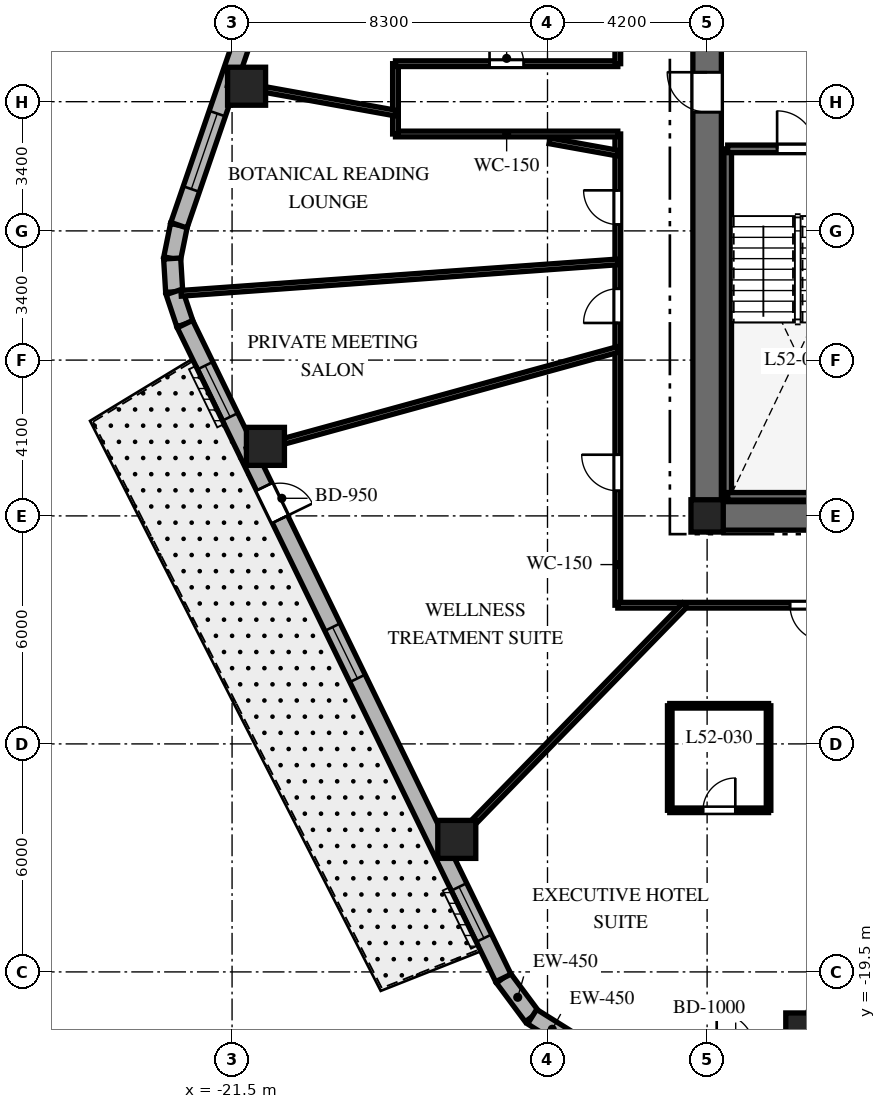
"""IFC4 building model, lengths in metres.
Left out: names, types, materials, properties, quantities, classifications, styles, units other than length and angle.
Written with IfcOpenShell. Run it as: python <this file> out.ifc"""

import sys

from ifc_helpers import new_model, si_unit, direction, frame, frame_2d, origin, origin_2d, place, context, subcontext, project, spatial, rectangle, extrude, element, fill, save


model = new_model("IFC4")
c1 = context("Model", 3, precision=1e-05, world=origin(), true_north=direction((0.0, 1.0)))
c2 = subcontext(c1, "Body", "Model", "MODEL_VIEW")
j1 = project(units=[si_unit("LENGTHUNIT", "METRE"), si_unit("PLANEANGLEUNIT", "RADIAN")], contexts=[c1])
p1 = place(None, origin())
s1 = spatial("IfcSite", under=j1, at=p1, CompositionType="ELEMENT")
p2 = place(p1, origin())
s2 = spatial("IfcBuilding", under=s1, at=p2, CompositionType="ELEMENT")
p3 = place(p2, frame((0.0, 0.0, 210.3)))
s3 = spatial("IfcBuildingStorey", under=s2, at=p3, CompositionType="ELEMENT", Elevation=210.3)
p4 = place(p3, frame((-9.375, -7.5, 0.0), z_axis=(0.0, 0.0, 1.0), x_axis=(1.0, 0.0, 0.0)))
e1 = element("IfcWall", 1, at=p4, inside=s3, PredefinedType="SHEAR", context=c2, shape_type="SweptSolid", body=[
    extrude(rectangle(XDim=18.75, YDim=0.75, at=frame_2d((9.375, 0.0))), origin(), (0.0, 0.0, 1.0), 3.8),
])
p5 = place(p4, frame((9.425, 0.0, 0.0)))
e2 = element("IfcOpeningElement", 2, at=p5, cuts=e1, PredefinedType="OPENING", context=c2, shape_type="SweptSolid", body=[
    extrude(rectangle(XDim=1.0, YDim=2.15, at=frame_2d((0.5, 1.075))), frame((0.0, 0.385, 0.0), z_axis=(0.0, -1.0, 0.0), x_axis=(1.0, 0.0, 0.0)), (0.0, 0.0, 1.0), 0.77),
])
p6 = place(p3, frame((-9.0, -7.125, 0.0), z_axis=(0.0, 0.0, 1.0), x_axis=(0.0, 1.0, 0.0)))
e3 = element("IfcWall", 3, at=p6, inside=s3, PredefinedType="SHEAR", context=c2, shape_type="SweptSolid", body=[
    extrude(rectangle(XDim=14.25, YDim=0.75, at=frame_2d((7.125, 0.0))), origin(), (0.0, 0.0, 1.0), 3.8),
])
p7 = place(p6, frame((10.25, 0.0, 0.0)))
e4 = element("IfcOpeningElement", 4, at=p7, cuts=e3, PredefinedType="OPENING", context=c2, shape_type="SweptSolid", body=[
    extrude(rectangle(XDim=1.05, YDim=2.15, at=frame_2d((0.525, 1.075))), frame((0.0, 0.385, 0.0), z_axis=(0.0, -1.0, 0.0), x_axis=(1.0, 0.0, 0.0)), (0.0, 0.0, 1.0), 0.77),
])
p8 = place(p3, frame((-8.458, -6.985, 0.0), z_axis=(0.0, 0.0, 1.0), x_axis=(0.0, 1.0, 0.0)))
e5 = element("IfcWall", 5, at=p8, inside=s3, PredefinedType="SHEAR", context=c2, shape_type="SweptSolid", body=[
    extrude(rectangle(XDim=9.143, YDim=0.2, at=frame_2d((4.572, 0.0))), origin(), (0.0, 0.0, 1.0), 3.8),
])
p9 = place(p3, frame((-8.458, -6.985, 0.0), z_axis=(0.0, 0.0, 1.0), x_axis=(1.0, 0.0, 0.0)))
e6 = element("IfcWall", 6, at=p9, inside=s3, PredefinedType="SHEAR", context=c2, shape_type="SweptSolid", body=[
    extrude(rectangle(XDim=3.686, YDim=0.2, at=frame_2d((1.843, 0.0))), origin(), (0.0, 0.0, 1.0), 3.8),
])
p10 = place(p3, frame((-8.458, 2.158, 0.0), z_axis=(0.0, 0.0, 1.0), x_axis=(1.0, 0.0, 0.0)))
e7 = element("IfcWall", 7, at=p10, inside=s3, PredefinedType="SHEAR", context=c2, shape_type="SweptSolid", body=[
    extrude(rectangle(XDim=3.686, YDim=0.2, at=frame_2d((1.843, 0.0))), origin(), (0.0, 0.0, 1.0), 3.8),
])
p11 = place(p10, frame((1.3, 0.0, 0.0)))
e8 = element("IfcOpeningElement", 8, at=p11, cuts=e7, PredefinedType="OPENING", context=c2, shape_type="SweptSolid", body=[
    extrude(rectangle(XDim=1.0, YDim=2.15, at=frame_2d((0.5, 1.075))), frame((0.0, 0.11, 0.0), z_axis=(0.0, -1.0, 0.0), x_axis=(1.0, 0.0, 0.0)), (0.0, 0.0, 1.0), 0.22),
])
p12 = place(p3, frame((-9.0, -7.5, 0.0), z_axis=(0.0, 0.0, 1.0), x_axis=(1.0, 0.0, 0.0)))
e9 = element("IfcColumn", 9, at=p12, inside=s3, PredefinedType="COLUMN", context=c2, shape_type="SweptSolid", body=[
    extrude(rectangle(XDim=0.85, YDim=0.85, at=origin_2d()), origin(), (0.0, 0.0, 1.0), 3.8),
])
for number, where, z_axis, x_axis in (
    (10, (-6.43, -21.08, 0.0), (0.0, 0.0, 1.0), (1.0, 0.0, 0.0)),
    (11, (-21.118, 3.807, 0.0), (0.0, 0.0, 1.0), (1.0, 0.0, 0.0)),
    (12, (-20.622, -5.67, 0.0), (0.0, 0.0, 1.0), (1.0, 0.0, 0.0)),
    (13, (-15.587, -16.013, 0.0), (0.0, 0.0, 1.0), (1.0, 0.0, 0.0)),
):
    element("IfcColumn", number, at=place(p3, frame(where, z_axis=z_axis, x_axis=x_axis)), inside=s3, PredefinedType="COLUMN", context=c2, shape_type="SweptSolid", body=[
        extrude(rectangle(XDim=1.0, YDim=1.0, at=origin_2d()), origin(), (0.0, 0.0, 1.0), 3.8),
    ])
p13 = place(p3, frame((-14.362, -19.658, 0.0), z_axis=(0.0, 0.0, 1.0), x_axis=(0.596642462792, -0.80250717853, 0.0)))
e14 = element("IfcWall", 14, at=p13, inside=s3, PredefinedType="SOLIDWALL", context=c2, shape_type="SweptSolid", body=[
    extrude(rectangle(XDim=1.27, YDim=0.45, at=frame_2d((0.635, 0.0))), origin(), (0.0, 0.0, 1.0), 3.5),
])
p14 = place(p3, frame((-13.604, -20.678, 0.0), z_axis=(0.0, 0.0, 1.0), x_axis=(0.847910404124, -0.53013955387, 0.0)))
e15 = element("IfcWall", 15, at=p14, inside=s3, PredefinedType="SOLIDWALL", context=c2, shape_type="SweptSolid", body=[
    extrude(rectangle(XDim=1.249, YDim=0.45, at=frame_2d((0.624, 0.0))), origin(), (0.0, 0.0, 1.0), 3.5),
])
p15 = place(p3, frame((-22.898, 0.15, 0.0), z_axis=(0.0, 0.0, 1.0), x_axis=(-0.199055826889, -0.979988151858, 0.0)))
e16 = element("IfcWall", 16, at=p15, inside=s3, PredefinedType="SOLIDWALL", context=c2, shape_type="SweptSolid", body=[
    extrude(rectangle(XDim=0.894, YDim=0.45, at=frame_2d((0.447, 0.0))), origin(), (0.0, 0.0, 1.0), 3.5),
])
p16 = place(p3, frame((-23.076, -0.727, 0.0), z_axis=(0.0, 0.0, 1.0), x_axis=(0.060805222108, -0.998149650586, 0.0)))
e17 = element("IfcWall", 17, at=p16, inside=s3, PredefinedType="SOLIDWALL", context=c2, shape_type="SweptSolid", body=[
    extrude(rectangle(XDim=0.879, YDim=0.45, at=frame_2d((0.44, 0.0))), origin(), (0.0, 0.0, 1.0), 3.5),
])
p17 = place(p3, frame((-23.023, -1.604, 0.0), z_axis=(0.0, 0.0, 1.0), x_axis=(0.316801227695, -0.948491951537, 0.0)))
e18 = element("IfcWall", 18, at=p17, inside=s3, PredefinedType="SOLIDWALL", context=c2, shape_type="SweptSolid", body=[
    extrude(rectangle(XDim=0.894, YDim=0.45, at=frame_2d((0.447, 0.0))), origin(), (0.0, 0.0, 1.0), 3.5),
])
p18 = place(p3, frame((-16.324, 19.275, 0.0), z_axis=(0.0, 0.0, 1.0), x_axis=(-0.325083142304, -0.945685439557, 0.0)))
e19 = element("IfcWall", 19, at=p18, inside=s3, PredefinedType="SOLIDWALL", context=c2, shape_type="SweptSolid", body=[
    extrude(rectangle(XDim=20.224, YDim=0.45, at=frame_2d((10.112, 0.0))), origin(), (0.0, 0.0, 1.0), 3.5),
])
p19 = place(p18, frame((0.953, 0.0, 0.8)))
e20 = element("IfcOpeningElement", 20, at=p19, cuts=e19, PredefinedType="OPENING", context=c2, shape_type="SweptSolid", body=[
    extrude(rectangle(XDim=2.1, YDim=1.85, at=frame_2d((1.05, 0.925))), frame((0.0, 0.235, 0.0), z_axis=(0.0, -1.0, 0.0), x_axis=(1.0, 0.0, 0.0)), (0.0, 0.0, 1.0), 0.47),
])
p20 = place(p18, frame((6.268, 0.0, 0.8)))
e21 = element("IfcOpeningElement", 21, at=p20, cuts=e19, PredefinedType="OPENING", context=c2, shape_type="SweptSolid", body=[
    extrude(rectangle(XDim=2.1, YDim=1.85, at=frame_2d((1.05, 0.925))), frame((0.0, 0.235, 0.0), z_axis=(0.0, -1.0, 0.0), x_axis=(1.0, 0.0, 0.0)), (0.0, 0.0, 1.0), 0.47),
])
p21 = place(p18, frame((11.95, 0.0, 0.8)))
e22 = element("IfcOpeningElement", 22, at=p21, cuts=e19, PredefinedType="OPENING", context=c2, shape_type="SweptSolid", body=[
    extrude(rectangle(XDim=2.1, YDim=1.85, at=frame_2d((1.05, 0.925))), frame((0.0, 0.235, 0.0), z_axis=(0.0, -1.0, 0.0), x_axis=(1.0, 0.0, 0.0)), (0.0, 0.0, 1.0), 0.47),
])
p22 = place(p18, frame((17.118, 0.0, 0.8)))
e23 = element("IfcOpeningElement", 23, at=p22, cuts=e19, PredefinedType="OPENING", context=c2, shape_type="SweptSolid", body=[
    extrude(rectangle(XDim=2.1, YDim=1.85, at=frame_2d((1.05, 0.925))), frame((0.0, 0.235, 0.0), z_axis=(0.0, -1.0, 0.0), x_axis=(1.0, 0.0, 0.0)), (0.0, 0.0, 1.0), 0.47),
])
p23 = place(p3, frame((-22.74, -2.452, 0.0), z_axis=(0.0, 0.0, 1.0), x_axis=(0.437753424814, -0.899095066755, 0.0)))
e24 = element("IfcWall", 24, at=p23, inside=s3, PredefinedType="SOLIDWALL", context=c2, shape_type="SweptSolid", body=[
    extrude(rectangle(XDim=19.137, YDim=0.45, at=frame_2d((9.569, 0.0))), origin(), (0.0, 0.0, 1.0), 3.5),
])
p24 = place(p23, frame((4.763, 0.0, 0.0)))
e25 = element("IfcOpeningElement", 25, at=p24, cuts=e24, PredefinedType="OPENING", context=c2, shape_type="SweptSolid", body=[
    extrude(rectangle(XDim=0.95, YDim=2.15, at=frame_2d((0.475, 1.075))), frame((0.0, 0.235, 0.0), z_axis=(0.0, -1.0, 0.0), x_axis=(1.0, 0.0, 0.0)), (0.0, 0.0, 1.0), 0.47),
])
p25 = place(p23, frame((1.216, 0.0, 0.8)))
e26 = element("IfcOpeningElement", 26, at=p25, cuts=e24, PredefinedType="OPENING", context=c2, shape_type="SweptSolid", body=[
    extrude(rectangle(XDim=1.5, YDim=1.8, at=frame_2d((0.75, 0.9))), frame((0.0, 0.235, 0.0), z_axis=(0.0, -1.0, 0.0), x_axis=(1.0, 0.0, 0.0)), (0.0, 0.0, 1.0), 0.47),
])
p26 = place(p23, frame((8.87, 0.0, 0.8)))
e27 = element("IfcOpeningElement", 27, at=p26, cuts=e24, PredefinedType="OPENING", context=c2, shape_type="SweptSolid", body=[
    extrude(rectangle(XDim=1.5, YDim=1.8, at=frame_2d((0.75, 0.9))), frame((0.0, 0.235, 0.0), z_axis=(0.0, -1.0, 0.0), x_axis=(1.0, 0.0, 0.0)), (0.0, 0.0, 1.0), 0.47),
])
p27 = place(p23, frame((16.473, 0.0, 0.8)))
e28 = element("IfcOpeningElement", 28, at=p27, cuts=e24, PredefinedType="OPENING", context=c2, shape_type="SweptSolid", body=[
    extrude(rectangle(XDim=1.5, YDim=1.8, at=frame_2d((0.75, 0.9))), frame((0.0, 0.235, 0.0), z_axis=(0.0, -1.0, 0.0), x_axis=(1.0, 0.0, 0.0)), (0.0, 0.0, 1.0), 0.47),
])
p28 = place(p3, frame((-11.35, -9.85, 0.0), z_axis=(0.0, 0.0, 1.0), x_axis=(0.0, 1.0, 0.0)))
e29 = element("IfcWall", 29, at=p28, inside=s3, PredefinedType="PARTITIONING", context=c2, shape_type="SweptSolid", body=[
    extrude(rectangle(XDim=12.4, YDim=0.15, at=frame_2d((6.2, 0.0))), origin(), (0.0, 0.0, 1.0), 2.99),
])
p29 = place(p28, frame((10.017, 0.0, 0.0)))
e30 = element("IfcOpeningElement", 30, at=p29, cuts=e29, PredefinedType="OPENING", context=c2, shape_type="SweptSolid", body=[
    extrude(rectangle(XDim=0.9, YDim=2.03, at=frame_2d((0.45, 1.015))), frame((0.0, 0.085, 0.0), z_axis=(0.0, -1.0, 0.0), x_axis=(1.0, 0.0, 0.0)), (0.0, 0.0, 1.0), 0.17),
])
p30 = place(p28, frame((7.427, 0.0, 0.0)))
e31 = element("IfcOpeningElement", 31, at=p30, cuts=e29, PredefinedType="OPENING", context=c2, shape_type="SweptSolid", body=[
    extrude(rectangle(XDim=0.9, YDim=2.03, at=frame_2d((0.45, 1.015))), frame((0.0, 0.085, 0.0), z_axis=(0.0, -1.0, 0.0), x_axis=(1.0, 0.0, 0.0)), (0.0, 0.0, 1.0), 0.17),
])
p31 = place(p28, frame((3.01, 0.0, 0.0)))
e32 = element("IfcOpeningElement", 32, at=p31, cuts=e29, PredefinedType="OPENING", context=c2, shape_type="SweptSolid", body=[
    extrude(rectangle(XDim=0.95, YDim=2.03, at=frame_2d((0.475, 1.015))), frame((0.0, 0.085, 0.0), z_axis=(0.0, -1.0, 0.0), x_axis=(1.0, 0.0, 0.0)), (0.0, 0.0, 1.0), 0.17),
])
p32 = place(p3, frame((-11.35, 2.55, 0.0), z_axis=(0.0, 0.0, 1.0), x_axis=(-1.0, 0.0, 0.0)))
e33 = element("IfcWall", 33, at=p32, inside=s3, PredefinedType="PARTITIONING", context=c2, shape_type="SweptSolid", body=[
    extrude(rectangle(XDim=5.85, YDim=0.15, at=frame_2d((2.925, 0.0))), origin(), (0.0, 0.0, 1.0), 2.94),
])
p33 = place(p3, frame((-17.2, 2.55, 0.0), z_axis=(0.0, 0.0, 1.0), x_axis=(0.0, 1.0, 0.0)))
e34 = element("IfcWall", 34, at=p33, inside=s3, PredefinedType="PARTITIONING", context=c2, shape_type="SweptSolid", body=[
    extrude(rectangle(XDim=1.85, YDim=0.15, at=frame_2d((0.925, 0.0))), origin(), (0.0, 0.0, 1.0), 2.94),
])
p34 = place(p3, frame((-17.2, 4.4, 0.0), z_axis=(0.0, 0.0, 1.0), x_axis=(1.0, 0.0, 0.0)))
e35 = element("IfcWall", 35, at=p34, inside=s3, PredefinedType="PARTITIONING", context=c2, shape_type="SweptSolid", body=[
    extrude(rectangle(XDim=5.85, YDim=0.15, at=frame_2d((2.925, 0.0))), origin(), (0.0, 0.0, 1.0), 2.94),
])
p35 = place(p34, frame((2.475, 0.0, 0.0)))
e36 = element("IfcOpeningElement", 36, at=p35, cuts=e35, PredefinedType="OPENING", context=c2, shape_type="SweptSolid", body=[
    extrude(rectangle(XDim=0.9, YDim=2.03, at=frame_2d((0.45, 1.015))), frame((0.0, 0.085, 0.0), z_axis=(0.0, -1.0, 0.0), x_axis=(1.0, 0.0, 0.0)), (0.0, 0.0, 1.0), 0.17),
])
p36 = place(p3, frame((-11.35, 4.4, 0.0), z_axis=(0.0, 0.0, 1.0), x_axis=(0.0, 1.0, 0.0)))
e37 = element("IfcWall", 37, at=p36, inside=s3, PredefinedType="PARTITIONING", context=c2, shape_type="SweptSolid", body=[
    extrude(rectangle(XDim=5.45, YDim=0.15, at=frame_2d((2.725, 0.0))), origin(), (0.0, 0.0, 1.0), 2.99),
])
p37 = place(p36, frame((2.694, 0.0, 0.0)))
e38 = element("IfcOpeningElement", 38, at=p37, cuts=e37, PredefinedType="OPENING", context=c2, shape_type="SweptSolid", body=[
    extrude(rectangle(XDim=0.95, YDim=2.03, at=frame_2d((0.475, 1.015))), frame((0.0, 0.085, 0.0), z_axis=(0.0, -1.0, 0.0), x_axis=(1.0, 0.0, 0.0)), (0.0, 0.0, 1.0), 0.17),
])
p38 = place(p3, frame((-0.92, -9.85, 0.0), z_axis=(0.0, 0.0, 1.0), x_axis=(-1.0, 0.0, 0.0)))
e39 = element("IfcWall", 39, at=p38, inside=s3, PredefinedType="PARTITIONING", context=c2, shape_type="SweptSolid", body=[
    extrude(rectangle(XDim=10.43, YDim=0.15, at=frame_2d((5.215, 0.0))), origin(), (0.0, 0.0, 1.0), 2.99),
])
p39 = place(p38, frame((4.949, 0.0, 0.0)))
e40 = element("IfcOpeningElement", 40, at=p39, cuts=e39, PredefinedType="OPENING", context=c2, shape_type="SweptSolid", body=[
    extrude(rectangle(XDim=0.95, YDim=2.03, at=frame_2d((0.475, 1.015))), frame((0.0, 0.085, 0.0), z_axis=(0.0, -1.0, 0.0), x_axis=(1.0, 0.0, 0.0)), (0.0, 0.0, 1.0), 0.17),
])
p40 = place(p3, frame((-11.35, 2.046, 0.0), z_axis=(0.0, 0.0, 1.0), x_axis=(-0.984127783205, 0.177461281195, 0.0)))
e41 = element("IfcWall", 41, at=p40, inside=s3, PredefinedType="PARTITIONING", context=c2, shape_type="SweptSolid", body=[
    extrude(rectangle(XDim=1.826, YDim=0.15, at=frame_2d((0.913, 0.0))), origin(), (0.0, 0.0, 1.0), 3.5),
])
p41 = place(p3, frame((-17.2, 3.101, 0.0), z_axis=(0.0, 0.0, 1.0), x_axis=(-0.98413465883, 0.177423147559, 0.0)))
e42 = element("IfcWall", 42, at=p41, inside=s3, PredefinedType="PARTITIONING", context=c2, shape_type="SweptSolid", body=[
    extrude(rectangle(XDim=4.482, YDim=0.15, at=frame_2d((2.241, 0.0))), origin(), (0.0, 0.0, 1.0), 2.74),
])
p42 = place(p3, frame((-11.35, -0.816, 0.0), z_axis=(0.0, 0.0, 1.0), x_axis=(-0.997425460629, -0.071710881252, 0.0)))
e43 = element("IfcWall", 43, at=p42, inside=s3, PredefinedType="PARTITIONING", context=c2, shape_type="SweptSolid", body=[
    extrude(rectangle(XDim=11.521, YDim=0.15, at=frame_2d((5.76, 0.0))), origin(), (0.0, 0.0, 1.0), 2.74),
])
p43 = place(p3, frame((-11.35, -3.121, 0.0), z_axis=(0.0, 0.0, 1.0), x_axis=(-0.964212793822, -0.265129568758, 0.0)))
e44 = element("IfcWall", 44, at=p43, inside=s3, PredefinedType="PARTITIONING", context=c2, shape_type="SweptSolid", body=[
    extrude(rectangle(XDim=10.12, YDim=0.15, at=frame_2d((5.06, 0.0))), origin(), (0.0, 0.0, 1.0), 2.74),
])
p44 = place(p3, frame((-9.588, -9.85, 0.0), z_axis=(0.0, 0.0, 1.0), x_axis=(-0.697519469595, -0.716565830567, 0.0)))
e45 = element("IfcWall", 45, at=p44, inside=s3, PredefinedType="PARTITIONING", context=c2, shape_type="SweptSolid", body=[
    extrude(rectangle(XDim=9.126, YDim=0.15, at=frame_2d((4.563, 0.0))), origin(), (0.0, 0.0, 1.0), 2.74),
])
p45 = place(p3, frame((-3.004, -9.85, 0.0), z_axis=(0.0, 0.0, 1.0), x_axis=(-0.291775760688, -0.956486751333, 0.0)))
e46 = element("IfcWall", 46, at=p45, inside=s3, PredefinedType="PARTITIONING", context=c2, shape_type="SweptSolid", body=[
    extrude(rectangle(XDim=12.258, YDim=0.15, at=frame_2d((6.129, 0.0))), origin(), (0.0, 0.0, 1.0), 2.74),
])
p46 = place(p3, frame((-9.983, -15.247, 0.0), z_axis=(0.0, 0.0, 1.0), x_axis=(1.0, 0.0, 0.0)))
e47 = element("IfcWall", 47, at=p46, inside=s3, PredefinedType="PARTITIONING", context=c2, shape_type="SweptSolid", body=[
    extrude(rectangle(XDim=2.6, YDim=0.12, at=frame_2d((1.3, 0.0))), origin(), (0.0, 0.0, 1.0), 3.072),
])
p47 = place(p46, frame((0.875, 0.0, 0.0)))
e48 = element("IfcOpeningElement", 48, at=p47, cuts=e47, PredefinedType="OPENING", context=c2, shape_type="SweptSolid", body=[
    extrude(rectangle(XDim=0.85, YDim=2.03, at=frame_2d((0.425, 1.015))), frame((0.0, 0.07, 0.0), z_axis=(0.0, -1.0, 0.0), x_axis=(1.0, 0.0, 0.0)), (0.0, 0.0, 1.0), 0.14),
])
p48 = place(p3, frame((-7.383, -15.247, 0.0), z_axis=(0.0, 0.0, 1.0), x_axis=(0.0, 1.0, 0.0)))
e49 = element("IfcWall", 49, at=p48, inside=s3, PredefinedType="PARTITIONING", context=c2, shape_type="SweptSolid", body=[
    extrude(rectangle(XDim=2.75, YDim=0.12, at=frame_2d((1.375, 0.0))), origin(), (0.0, 0.0, 1.0), 2.94),
])
p49 = place(p3, frame((-7.383, -12.497, 0.0), z_axis=(0.0, 0.0, 1.0), x_axis=(-1.0, 0.0, 0.0)))
e50 = element("IfcWall", 50, at=p49, inside=s3, PredefinedType="PARTITIONING", context=c2, shape_type="SweptSolid", body=[
    extrude(rectangle(XDim=2.6, YDim=0.12, at=frame_2d((1.3, 0.0))), origin(), (0.0, 0.0, 1.0), 2.94),
])
p50 = place(p3, frame((-9.983, -12.497, 0.0), z_axis=(0.0, 0.0, 1.0), x_axis=(0.0, -1.0, 0.0)))
e51 = element("IfcWall", 51, at=p50, inside=s3, PredefinedType="PARTITIONING", context=c2, shape_type="SweptSolid", body=[
    extrude(rectangle(XDim=2.75, YDim=0.12, at=frame_2d((1.375, 0.0))), origin(), (0.0, 0.0, 1.0), 3.072),
])
p51 = place(p22, origin())
e52 = element("IfcWindow", 52, at=p51, inside=s3, PartitioningType="SINGLE_PANEL", PredefinedType="WINDOW", context=c2, shape_type="SweptSolid", body=[
    extrude(rectangle(XDim=2.1, YDim=1.85, at=frame_2d((1.05, 0.925))), frame((0.0, 0.03, 0.0), z_axis=(0.0, -1.0, 0.0), x_axis=(1.0, 0.0, 0.0)), (0.0, 0.0, 1.0), 0.06),
])
fill(e23, e52)
p52 = place(p24, origin())
e53 = element("IfcDoor", 53, at=p52, inside=s3, OperationType="SINGLE_SWING_RIGHT", PredefinedType="DOOR", context=c2, shape_type="SweptSolid", body=[
    extrude(rectangle(XDim=0.95, YDim=2.15, at=frame_2d((0.475, 1.075))), frame((0.0, 0.025, 0.0), z_axis=(0.0, -1.0, 0.0), x_axis=(1.0, 0.0, 0.0)), (0.0, 0.0, 1.0), 0.05),
])
fill(e25, e53)
p53 = place(p25, origin())
e54 = element("IfcWindow", 54, at=p53, inside=s3, PartitioningType="SINGLE_PANEL", PredefinedType="WINDOW", context=c2, shape_type="SweptSolid", body=[
    extrude(rectangle(XDim=1.5, YDim=1.8, at=frame_2d((0.75, 0.9))), frame((0.0, 0.03, 0.0), z_axis=(0.0, -1.0, 0.0), x_axis=(1.0, 0.0, 0.0)), (0.0, 0.0, 1.0), 0.06),
])
fill(e26, e54)
p54 = place(p26, origin())
e55 = element("IfcWindow", 55, at=p54, inside=s3, PartitioningType="SINGLE_PANEL", PredefinedType="WINDOW", context=c2, shape_type="SweptSolid", body=[
    extrude(rectangle(XDim=1.5, YDim=1.8, at=frame_2d((0.75, 0.9))), frame((0.0, 0.03, 0.0), z_axis=(0.0, -1.0, 0.0), x_axis=(1.0, 0.0, 0.0)), (0.0, 0.0, 1.0), 0.06),
])
fill(e27, e55)
p55 = place(p27, origin())
e56 = element("IfcWindow", 56, at=p55, inside=s3, PartitioningType="SINGLE_PANEL", PredefinedType="WINDOW", context=c2, shape_type="SweptSolid", body=[
    extrude(rectangle(XDim=1.5, YDim=1.8, at=frame_2d((0.75, 0.9))), frame((0.0, 0.03, 0.0), z_axis=(0.0, -1.0, 0.0), x_axis=(1.0, 0.0, 0.0)), (0.0, 0.0, 1.0), 0.06),
])
fill(e28, e56)
p56 = place(p11, origin())
e57 = element("IfcDoor", 57, at=p56, inside=s3, OperationType="SINGLE_SWING_LEFT", PredefinedType="DOOR", context=c2, shape_type="SweptSolid", body=[
    extrude(rectangle(XDim=1.0, YDim=2.15, at=frame_2d((0.5, 1.075))), frame((0.0, 0.025, 0.0), z_axis=(0.0, -1.0, 0.0), x_axis=(1.0, 0.0, 0.0)), (0.0, 0.0, 1.0), 0.05),
])
fill(e8, e57)
p57 = place(p7, origin())
e58 = element("IfcDoor", 58, at=p57, inside=s3, OperationType="SINGLE_SWING_RIGHT", PredefinedType="DOOR", context=c2, shape_type="SweptSolid", body=[
    extrude(rectangle(XDim=1.05, YDim=2.15, at=frame_2d((0.525, 1.075))), frame((0.0, 0.025, 0.0), z_axis=(0.0, -1.0, 0.0), x_axis=(1.0, 0.0, 0.0)), (0.0, 0.0, 1.0), 0.05),
])
fill(e4, e58)
p58 = place(p35, origin())
e59 = element("IfcDoor", 59, at=p58, inside=s3, OperationType="SINGLE_SWING_LEFT", PredefinedType="DOOR", context=c2, shape_type="SweptSolid", body=[
    extrude(rectangle(XDim=0.9, YDim=2.03, at=frame_2d((0.45, 1.015))), frame((0.0, 0.025, 0.0), z_axis=(0.0, -1.0, 0.0), x_axis=(1.0, 0.0, 0.0)), (0.0, 0.0, 1.0), 0.05),
])
fill(e36, e59)
p59 = place(p29, origin())
e60 = element("IfcDoor", 60, at=p59, inside=s3, OperationType="SINGLE_SWING_RIGHT", PredefinedType="DOOR", context=c2, shape_type="SweptSolid", body=[
    extrude(rectangle(XDim=0.9, YDim=2.03, at=frame_2d((0.45, 1.015))), frame((0.0, 0.025, 0.0), z_axis=(0.0, -1.0, 0.0), x_axis=(1.0, 0.0, 0.0)), (0.0, 0.0, 1.0), 0.05),
])
fill(e30, e60)
p60 = place(p30, origin())
e61 = element("IfcDoor", 61, at=p60, inside=s3, OperationType="SINGLE_SWING_LEFT", PredefinedType="DOOR", context=c2, shape_type="SweptSolid", body=[
    extrude(rectangle(XDim=0.9, YDim=2.03, at=frame_2d((0.45, 1.015))), frame((0.0, 0.025, 0.0), z_axis=(0.0, -1.0, 0.0), x_axis=(1.0, 0.0, 0.0)), (0.0, 0.0, 1.0), 0.05),
])
fill(e31, e61)
p61 = place(p31, origin())
e62 = element("IfcDoor", 62, at=p61, inside=s3, OperationType="SINGLE_SWING_RIGHT", PredefinedType="DOOR", context=c2, shape_type="SweptSolid", body=[
    extrude(rectangle(XDim=0.95, YDim=2.03, at=frame_2d((0.475, 1.015))), frame((0.0, 0.025, 0.0), z_axis=(0.0, -1.0, 0.0), x_axis=(1.0, 0.0, 0.0)), (0.0, 0.0, 1.0), 0.05),
])
fill(e32, e62)
p62 = place(p39, origin())
e63 = element("IfcDoor", 63, at=p62, inside=s3, OperationType="SINGLE_SWING_LEFT", PredefinedType="DOOR", context=c2, shape_type="SweptSolid", body=[
    extrude(rectangle(XDim=0.95, YDim=2.03, at=frame_2d((0.475, 1.015))), frame((0.0, 0.025, 0.0), z_axis=(0.0, -1.0, 0.0), x_axis=(1.0, 0.0, 0.0)), (0.0, 0.0, 1.0), 0.05),
])
fill(e40, e63)
p63 = place(p47, origin())
e64 = element("IfcDoor", 64, at=p63, inside=s3, OperationType="SINGLE_SWING_RIGHT", PredefinedType="DOOR", context=c2, shape_type="SweptSolid", body=[
    extrude(rectangle(XDim=0.85, YDim=2.03, at=frame_2d((0.425, 1.015))), frame((0.0, 0.025, 0.0), z_axis=(0.0, -1.0, 0.0), x_axis=(1.0, 0.0, 0.0)), (0.0, 0.0, 1.0), 0.05),
])
fill(e48, e64)
save(model, sys.argv[1])
